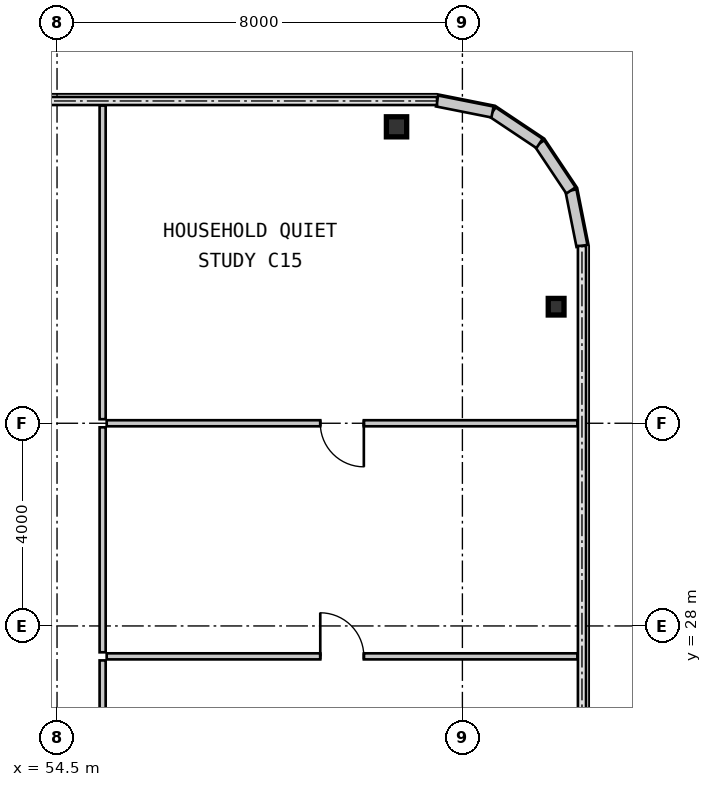
"""IFC4 building model, lengths in metres.
Left out: names, types, materials, properties, quantities, classifications, styles, units other than length and angle.
Written with IfcOpenShell. Run it as: python <this file> out.ifc"""

import sys

from ifc_helpers import new_model, si_unit, direction, frame, frame_2d, origin, origin_2d, place, context, subcontext, project, spatial, rectangle, i_section, extrude, source, transform, mapped, element, fill, save


model = new_model("IFC4")
c1 = context("Model", 3, precision=1e-05, world=origin(), true_north=direction((0.0, 1.0)))
c2 = subcontext(c1, "Body", "Model", "MODEL_VIEW")
j1 = project(units=[si_unit("LENGTHUNIT", "METRE"), si_unit("PLANEANGLEUNIT", "RADIAN")], contexts=[c1])
p1 = place(None, origin())
s1 = spatial("IfcSite", under=j1, at=p1, CompositionType="ELEMENT")
p2 = place(p1, origin())
s2 = spatial("IfcBuilding", under=s1, at=p2, CompositionType="ELEMENT")
p3 = place(p2, frame((0.0, 0.0, 51.45)))
s3 = spatial("IfcBuildingStorey", under=s2, at=p3, CompositionType="ELEMENT", Elevation=51.45)
m1 = source(origin(), c2, "Body", "SweptSolid", [
    extrude(i_section(OverallWidth=0.4, OverallDepth=0.396, WebThickness=0.022, FlangeThickness=0.034, at=origin_2d()), origin(), (0.0, 0.0, 1.0), 3.15),
])
p4 = place(p3, frame((61.2, 37.85, 0.0), z_axis=(0.0, 0.0, 1.0), x_axis=(1.0, 0.0, 0.0)))
e1 = element("IfcColumn", 1, at=p4, inside=s3, PredefinedType="COLUMN", context=c2, shape_type="MappedRepresentation", body=[
    mapped(m1, transform((0.0, 0.0, 0.0), scale=1.0)),
])
m2 = source(origin(), c2, "Body", "SweptSolid", [
    extrude(i_section(OverallWidth=0.311, OverallDepth=0.327, WebThickness=0.016, FlangeThickness=0.025, at=origin_2d()), origin(), (0.0, 0.0, 1.0), 3.15),
])
p5 = place(p3, frame((64.35, 34.3, 0.0), z_axis=(0.0, 0.0, 1.0), x_axis=(1.0, 0.0, 0.0)))
e2 = element("IfcColumn", 2, at=p5, inside=s3, PredefinedType="COLUMN", context=c2, shape_type="MappedRepresentation", body=[
    mapped(m2, transform((0.0, 0.0, 0.0), scale=1.0)),
])
m3 = source(origin(), c2, "Body", "SweptSolid", [
    extrude(rectangle(XDim=1.116, YDim=0.22, at=frame_2d((0.558, 0.0))), origin(), (0.0, 0.0, 1.0), 2.93),
])
for number, where, z_axis, x_axis in (
    (3, (64.86, 35.5, 0.0), (0.0, 0.0, 1.0), (-0.195, 0.981, 0.0)),
    (4, (64.642, 36.594, 0.0), (0.0, 0.0, 1.0), (-0.556, 0.831, 0.0)),
    (5, (64.022, 37.522, 0.0), (0.0, 0.0, 1.0), (-0.831, 0.556, 0.0)),
    (6, (63.094, 38.142, 0.0), (0.0, 0.0, 1.0), (-0.981, 0.195, 0.0)),
):
    element("IfcWall", number, at=place(p3, frame(where, z_axis=z_axis, x_axis=x_axis)), inside=s3, PredefinedType="SOLIDWALL", context=c2, shape_type="MappedRepresentation", body=[
        mapped(m3, transform((0.0, 0.0, 0.0), scale=1.0)),
    ])
m4 = source(origin(), c2, "Body", "SweptSolid", [
    extrude(rectangle(XDim=9.29, YDim=0.12, at=frame_2d((4.645, 0.0))), origin(), (0.0, 0.0, 1.0), 2.93),
])
p6 = place(p3, frame((55.48, 27.4, 0.0), z_axis=(0.0, 0.0, 1.0), x_axis=(1.0, 0.0, 0.0)))
e7 = element("IfcWall", 7, at=p6, inside=s3, PredefinedType="PARTITIONING", context=c2, shape_type="MappedRepresentation", body=[
    mapped(m4, transform((0.0, 0.0, 0.0), scale=1.0)),
])
m5 = source(origin(), c2, "Body", "SweptSolid", [
    extrude(rectangle(XDim=0.86, YDim=2.1, at=frame_2d((0.43, 1.05))), frame((0.0, 0.07, 0.0), z_axis=(0.0, -1.0, 0.0), x_axis=(1.0, 0.0, 0.0)), (0.0, 0.0, 1.0), 0.14),
])
p7 = place(p6, frame((4.215, 0.0, 0.0)))
e8 = element("IfcOpeningElement", 8, at=p7, cuts=e7, PredefinedType="OPENING", context=c2, shape_type="MappedRepresentation", body=[
    mapped(m5, transform((0.0, 0.0, 0.0), scale=1.0)),
])
m6 = source(origin(), c2, "Body", "SweptSolid", [
    extrude(rectangle(XDim=3.3, YDim=0.12, at=frame_2d((1.65, 0.0))), origin(), (0.0, 0.0, 1.0), 2.93),
])
p8 = place(p3, frame((55.4, 24.02, 0.0), z_axis=(0.0, 0.0, 1.0), x_axis=(0.0, 1.0, 0.0)))
e9 = element("IfcWall", 9, at=p8, inside=s3, PredefinedType="PARTITIONING", context=c2, shape_type="MappedRepresentation", body=[
    mapped(m6, transform((0.0, 0.0, 0.0), scale=1.0)),
])
p9 = place(p3, frame((55.48, 32.0, 0.0), z_axis=(0.0, 0.0, 1.0), x_axis=(1.0, 0.0, 0.0)))
e10 = element("IfcWall", 10, at=p9, inside=s3, PredefinedType="PARTITIONING", context=c2, shape_type="MappedRepresentation", body=[
    mapped(m4, transform((0.0, 0.0, 0.0), scale=1.0)),
])
p10 = place(p9, frame((4.215, 0.0, 0.0)))
e11 = element("IfcOpeningElement", 11, at=p10, cuts=e10, PredefinedType="OPENING", context=c2, shape_type="MappedRepresentation", body=[
    mapped(m5, transform((0.0, 0.0, 0.0), scale=1.0)),
])
m7 = source(origin(), c2, "Body", "SweptSolid", [
    extrude(rectangle(XDim=4.44, YDim=0.12, at=frame_2d((2.22, 0.0))), origin(), (0.0, 0.0, 1.0), 2.93),
])
p11 = place(p3, frame((55.4, 27.48, 0.0), z_axis=(0.0, 0.0, 1.0), x_axis=(0.0, 1.0, 0.0)))
e12 = element("IfcWall", 12, at=p11, inside=s3, PredefinedType="PARTITIONING", context=c2, shape_type="MappedRepresentation", body=[
    mapped(m7, transform((0.0, 0.0, 0.0), scale=1.0)),
])
m8 = source(origin(), c2, "Body", "SweptSolid", [
    extrude(rectangle(XDim=6.19, YDim=0.12, at=frame_2d((3.095, 0.0))), origin(), (0.0, 0.0, 1.0), 2.93),
])
p12 = place(p3, frame((55.4, 32.08, 0.0), z_axis=(0.0, 0.0, 1.0), x_axis=(0.0, 1.0, 0.0)))
e13 = element("IfcWall", 13, at=p12, inside=s3, PredefinedType="PARTITIONING", context=c2, shape_type="MappedRepresentation", body=[
    mapped(m8, transform((0.0, 0.0, 0.0), scale=1.0)),
])
m9 = source(origin(), c2, "Body", "SweptSolid", [
    extrude(rectangle(XDim=0.86, YDim=2.1, at=frame_2d((0.43, 1.05))), frame((0.0, 0.025, 0.0), z_axis=(0.0, -1.0, 0.0), x_axis=(1.0, 0.0, 0.0)), (0.0, 0.0, 1.0), 0.05),
])
p13 = place(p7, origin())
e14 = element("IfcDoor", 14, at=p13, inside=s3, OperationType="SINGLE_SWING_LEFT", PredefinedType="DOOR", context=c2, shape_type="MappedRepresentation", body=[
    mapped(m9, transform((0.0, 0.0, 0.0), scale=1.0)),
])
fill(e8, e14)
p14 = place(p10, frame((0.86, 0.0, 0.0), z_axis=(0.0, 0.0, 1.0), x_axis=(-1.0, 0.0, 0.0)))
e15 = element("IfcDoor", 15, at=p14, inside=s3, OperationType="SINGLE_SWING_LEFT", PredefinedType="DOOR", context=c2, shape_type="MappedRepresentation", body=[
    mapped(m9, transform((0.0, 0.0, 0.0), scale=1.0)),
])
fill(e11, e15)
save(model, sys.argv[1])
